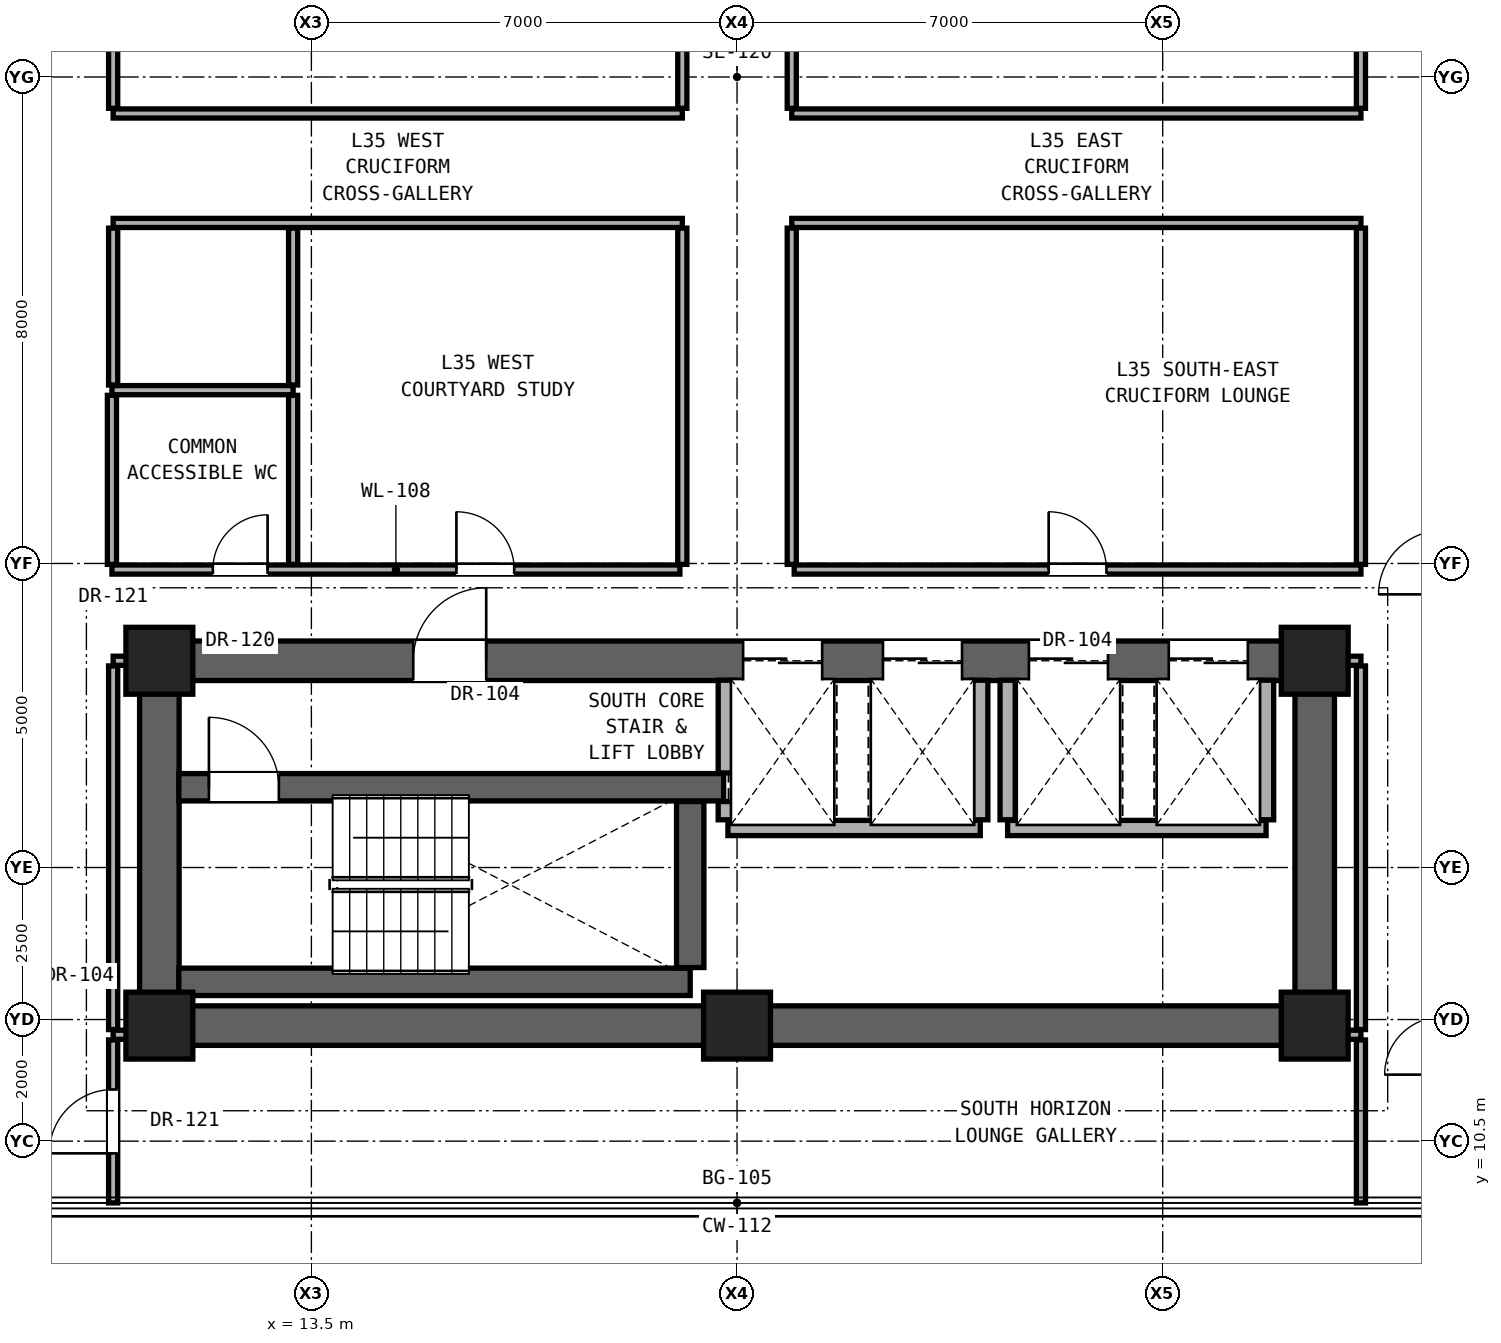
"""IFC4 building model, lengths in metres.
Left out: names, types, materials, properties, quantities, classifications, styles, units other than length and angle.
Written with IfcOpenShell. Run it as: python <this file> out.ifc"""

import sys

from ifc_helpers import new_model, si_unit, direction, frame, frame_2d, origin, origin_2d, place, context, subcontext, project, spatial, rectangle, extrude, element, fill, save


model = new_model("IFC4")
c1 = context("Model", 3, precision=1e-05, world=origin(), true_north=direction((0.0, 1.0)))
c2 = subcontext(c1, "Body", "Model", "MODEL_VIEW")
j1 = project(units=[si_unit("LENGTHUNIT", "METRE"), si_unit("PLANEANGLEUNIT", "RADIAN")], contexts=[c1])
p1 = place(None, origin())
s1 = spatial("IfcSite", under=j1, at=p1, CompositionType="ELEMENT")
p2 = place(p1, origin())
s2 = spatial("IfcBuilding", under=s1, at=p2, CompositionType="ELEMENT")
p3 = place(p2, frame((0.0, 0.0, 124.7)))
s3 = spatial("IfcBuildingStorey", under=s2, at=p3, CompositionType="ELEMENT", Elevation=124.7)
for number, where, z_axis, x_axis in (
    (1, (11.0, 12.4, 0.0), (0.0, 0.0, 1.0), (1.0, 0.0, 0.0)),
    (2, (20.5, 12.4, 0.0), (0.0, 0.0, 1.0), (1.0, 0.0, 0.0)),
    (3, (30.0, 12.4, 0.0), (0.0, 0.0, 1.0), (1.0, 0.0, 0.0)),
    (4, (11.0, 18.4, 0.0), (0.0, 0.0, 1.0), (1.0, 0.0, 0.0)),
    (5, (30.0, 18.4, 0.0), (0.0, 0.0, 1.0), (1.0, 0.0, 0.0)),
):
    element("IfcColumn", number, at=place(p3, frame(where, z_axis=z_axis, x_axis=x_axis)), inside=s3, PredefinedType="COLUMN", context=c2, shape_type="SweptSolid", body=[
        extrude(rectangle(XDim=1.1, YDim=1.1, at=origin_2d()), origin(), (0.0, 0.0, 1.0), 3.3),
    ])
p4 = place(p3, frame((11.0, 12.4, 0.0), z_axis=(0.0, 0.0, 1.0), x_axis=(1.0, 0.0, 0.0)))
e6 = element("IfcWall", 6, at=p4, inside=s3, PredefinedType="SHEAR", context=c2, shape_type="SweptSolid", body=[
    extrude(rectangle(XDim=19.0, YDim=0.65, at=frame_2d((9.5, 0.0))), origin(), (0.0, 0.0, 1.0), 3.08),
])
for number, where, z_axis, x_axis in (
    (7, (11.0, 12.4, 0.0), (0.0, 0.0, 1.0), (0.0, 1.0, 0.0)),
    (8, (30.0, 12.4, 0.0), (0.0, 0.0, 1.0), (0.0, 1.0, 0.0)),
):
    element("IfcWall", number, at=place(p3, frame(where, z_axis=z_axis, x_axis=x_axis)), inside=s3, PredefinedType="SHEAR", context=c2, shape_type="SweptSolid", body=[
        extrude(rectangle(XDim=6.0, YDim=0.65, at=frame_2d((3.0, 0.0))), origin(), (0.0, 0.0, 1.0), 3.08),
    ])
p5 = place(p3, frame((11.0, 18.4, 0.0), z_axis=(0.0, 0.0, 1.0), x_axis=(1.0, 0.0, 0.0)))
e9 = element("IfcWall", 9, at=p5, inside=s3, PredefinedType="SHEAR", context=c2, shape_type="SweptSolid", body=[
    extrude(rectangle(XDim=19.0, YDim=0.65, at=frame_2d((9.5, 0.0))), origin(), (0.0, 0.0, 1.0), 3.08),
])
p6 = place(p5, frame((4.175, 0.0, 0.0)))
e10 = element("IfcOpeningElement", 10, at=p6, cuts=e9, PredefinedType="OPENING", context=c2, shape_type="SweptSolid", body=[
    extrude(rectangle(XDim=1.2, YDim=2.25, at=frame_2d((0.6, 1.125))), frame((0.0, 0.335, 0.0), z_axis=(0.0, -1.0, 0.0), x_axis=(1.0, 0.0, 0.0)), (0.0, 0.0, 1.0), 0.67),
])
p7 = place(p5, frame((9.6, 0.0, 0.0)))
e11 = element("IfcOpeningElement", 11, at=p7, cuts=e9, PredefinedType="OPENING", context=c2, shape_type="SweptSolid", body=[
    extrude(rectangle(XDim=1.3, YDim=2.3, at=frame_2d((0.65, 1.15))), frame((0.0, 0.335, 0.0), z_axis=(0.0, -1.0, 0.0), x_axis=(1.0, 0.0, 0.0)), (0.0, 0.0, 1.0), 0.67),
])
p8 = place(p5, frame((11.9, 0.0, 0.0)))
e12 = element("IfcOpeningElement", 12, at=p8, cuts=e9, PredefinedType="OPENING", context=c2, shape_type="SweptSolid", body=[
    extrude(rectangle(XDim=1.3, YDim=2.3, at=frame_2d((0.65, 1.15))), frame((0.0, 0.335, 0.0), z_axis=(0.0, -1.0, 0.0), x_axis=(1.0, 0.0, 0.0)), (0.0, 0.0, 1.0), 0.67),
])
p9 = place(p5, frame((14.3, 0.0, 0.0)))
e13 = element("IfcOpeningElement", 13, at=p9, cuts=e9, PredefinedType="OPENING", context=c2, shape_type="SweptSolid", body=[
    extrude(rectangle(XDim=1.3, YDim=2.3, at=frame_2d((0.65, 1.15))), frame((0.0, 0.335, 0.0), z_axis=(0.0, -1.0, 0.0), x_axis=(1.0, 0.0, 0.0)), (0.0, 0.0, 1.0), 0.67),
])
p10 = place(p5, frame((16.6, 0.0, 0.0)))
e14 = element("IfcOpeningElement", 14, at=p10, cuts=e9, PredefinedType="OPENING", context=c2, shape_type="SweptSolid", body=[
    extrude(rectangle(XDim=1.3, YDim=2.3, at=frame_2d((0.65, 1.15))), frame((0.0, 0.335, 0.0), z_axis=(0.0, -1.0, 0.0), x_axis=(1.0, 0.0, 0.0)), (0.0, 0.0, 1.0), 0.67),
])
for number, where, z_axis, x_axis in (
    (15, (10.24, 12.25, 0.0), (0.0, 0.0, 1.0), (1.0, 0.0, 0.0)),
    (16, (30.32, 12.25, 0.0), (0.0, 0.0, 1.0), (1.0, 0.0, 0.0)),
):
    element("IfcWall", number, at=place(p3, frame(where, z_axis=z_axis, x_axis=x_axis)), inside=s3, PredefinedType="PARTITIONING", context=c2, shape_type="SweptSolid", body=[
        extrude(rectangle(XDim=0.44, YDim=0.15, at=frame_2d((0.22, 0.0))), origin(), (0.0, 0.0, 1.0), 3.08),
    ])
p11 = place(p3, frame((11.32, 13.12, 0.0), z_axis=(0.0, 0.0, 1.0), x_axis=(1.0, 0.0, 0.0)))
e17 = element("IfcWall", 17, at=p11, inside=s3, PredefinedType="SHEAR", context=c2, shape_type="SweptSolid", body=[
    extrude(rectangle(XDim=8.41, YDim=0.45, at=frame_2d((4.205, 0.0))), origin(), (0.0, 0.0, 1.0), 3.08),
])
p12 = place(p3, frame((20.35, 15.65, 0.0), z_axis=(0.0, 0.0, 1.0), x_axis=(1.0, 0.0, 0.0)))
e18 = element("IfcWall", 18, at=p12, inside=s3, PredefinedType="SOLIDWALL", context=c2, shape_type="SweptSolid", body=[
    extrude(rectangle(XDim=4.15, YDim=0.25, at=frame_2d((2.075, 0.0))), origin(), (0.0, 0.0, 1.0), 3.08),
])
p13 = place(p3, frame((24.95, 15.65, 0.0), z_axis=(0.0, 0.0, 1.0), x_axis=(1.0, 0.0, 0.0)))
e19 = element("IfcWall", 19, at=p13, inside=s3, PredefinedType="SOLIDWALL", context=c2, shape_type="SweptSolid", body=[
    extrude(rectangle(XDim=4.25, YDim=0.25, at=frame_2d((2.125, 0.0))), origin(), (0.0, 0.0, 1.0), 3.08),
])
p14 = place(p3, frame((11.32, 16.32, 0.0), z_axis=(0.0, 0.0, 1.0), x_axis=(1.0, 0.0, 0.0)))
e20 = element("IfcWall", 20, at=p14, inside=s3, PredefinedType="SHEAR", context=c2, shape_type="SweptSolid", body=[
    extrude(rectangle(XDim=8.96, YDim=0.45, at=frame_2d((4.48, 0.0))), origin(), (0.0, 0.0, 1.0), 3.08),
])
p15 = place(p14, frame((0.495, 0.0, 0.0)))
e21 = element("IfcOpeningElement", 21, at=p15, cuts=e20, PredefinedType="OPENING", context=c2, shape_type="SweptSolid", body=[
    extrude(rectangle(XDim=1.15, YDim=2.2, at=frame_2d((0.575, 1.1))), frame((0.0, 0.235, 0.0), z_axis=(0.0, -1.0, 0.0), x_axis=(1.0, 0.0, 0.0)), (0.0, 0.0, 1.0), 0.47),
])
for number, where, z_axis, x_axis in (
    (22, (10.24, 18.4, 0.0), (0.0, 0.0, 1.0), (1.0, 0.0, 0.0)),
    (23, (30.32, 18.4, 0.0), (0.0, 0.0, 1.0), (1.0, 0.0, 0.0)),
):
    element("IfcWall", number, at=place(p3, frame(where, z_axis=z_axis, x_axis=x_axis)), inside=s3, PredefinedType="PARTITIONING", context=c2, shape_type="SweptSolid", body=[
        extrude(rectangle(XDim=0.44, YDim=0.15, at=frame_2d((0.22, 0.0))), origin(), (0.0, 0.0, 1.0), 2.456),
    ])
p16 = place(p3, frame((10.22, 19.9, 0.0), z_axis=(0.0, 0.0, 1.0), x_axis=(1.0, 0.0, 0.0)))
e24 = element("IfcWall", 24, at=p16, inside=s3, PredefinedType="PARTITIONING", context=c2, shape_type="SweptSolid", body=[
    extrude(rectangle(XDim=9.34, YDim=0.15, at=frame_2d((4.67, 0.0))), origin(), (0.0, 0.0, 1.0), 2.216),
])
p17 = place(p16, frame((1.66, 0.0, 0.0)))
e25 = element("IfcOpeningElement", 25, at=p17, cuts=e24, PredefinedType="OPENING", context=c2, shape_type="SweptSolid", body=[
    extrude(rectangle(XDim=0.9, YDim=2.1, at=frame_2d((0.45, 1.05))), frame((0.0, 0.085, 0.0), z_axis=(0.0, -1.0, 0.0), x_axis=(1.0, 0.0, 0.0)), (0.0, 0.0, 1.0), 0.17),
])
p18 = place(p16, frame((5.665, 0.0, 0.0)))
e26 = element("IfcOpeningElement", 26, at=p18, cuts=e24, PredefinedType="OPENING", context=c2, shape_type="SweptSolid", body=[
    extrude(rectangle(XDim=0.95, YDim=2.15, at=frame_2d((0.475, 1.075))), frame((0.0, 0.085, 0.0), z_axis=(0.0, -1.0, 0.0), x_axis=(1.0, 0.0, 0.0)), (0.0, 0.0, 1.0), 0.17),
])
p19 = place(p3, frame((21.44, 19.9, 0.0), z_axis=(0.0, 0.0, 1.0), x_axis=(1.0, 0.0, 0.0)))
e27 = element("IfcWall", 27, at=p19, inside=s3, PredefinedType="PARTITIONING", context=c2, shape_type="SweptSolid", body=[
    extrude(rectangle(XDim=9.32, YDim=0.15, at=frame_2d((4.66, 0.0))), origin(), (0.0, 0.0, 1.0), 2.216),
])
p20 = place(p19, frame((4.185, 0.0, 0.0)))
e28 = element("IfcOpeningElement", 28, at=p20, cuts=e27, PredefinedType="OPENING", context=c2, shape_type="SweptSolid", body=[
    extrude(rectangle(XDim=0.95, YDim=2.15, at=frame_2d((0.475, 1.075))), frame((0.0, 0.085, 0.0), z_axis=(0.0, -1.0, 0.0), x_axis=(1.0, 0.0, 0.0)), (0.0, 0.0, 1.0), 0.17),
])
p21 = place(p3, frame((10.22, 22.85, 0.0), z_axis=(0.0, 0.0, 1.0), x_axis=(1.0, 0.0, 0.0)))
e29 = element("IfcWall", 29, at=p21, inside=s3, PredefinedType="PARTITIONING", context=c2, shape_type="SweptSolid", body=[
    extrude(rectangle(XDim=2.98, YDim=0.15, at=frame_2d((1.49, 0.0))), origin(), (0.0, 0.0, 1.0), 2.216),
])
for number, where, z_axis, x_axis in (
    (30, (10.24, 25.6, 0.0), (0.0, 0.0, 1.0), (1.0, 0.0, 0.0)),
    (31, (21.4, 25.6, 0.0), (0.0, 0.0, 1.0), (1.0, 0.0, 0.0)),
    (32, (10.24, 27.4, 0.0), (0.0, 0.0, 1.0), (1.0, 0.0, 0.0)),
    (33, (21.4, 27.4, 0.0), (0.0, 0.0, 1.0), (1.0, 0.0, 0.0)),
):
    element("IfcWall", number, at=place(p3, frame(where, z_axis=z_axis, x_axis=x_axis)), inside=s3, PredefinedType="PARTITIONING", context=c2, shape_type="SweptSolid", body=[
        extrude(rectangle(XDim=9.36, YDim=0.15, at=frame_2d((4.68, 0.0))), origin(), (0.0, 0.0, 1.0), 2.216),
    ])
p22 = place(p3, frame((10.22, 19.985, 0.0), z_axis=(0.0, 0.0, 1.0), x_axis=(0.0, 1.0, 0.0)))
e34 = element("IfcWall", 34, at=p22, inside=s3, PredefinedType="PARTITIONING", context=c2, shape_type="SweptSolid", body=[
    extrude(rectangle(XDim=2.78, YDim=0.15, at=frame_2d((1.39, 0.0))), origin(), (0.0, 0.0, 1.0), 3.08),
])
p23 = place(p3, frame((10.24, 9.484, 0.0), z_axis=(0.0, 0.0, 1.0), x_axis=(0.0, 1.0, 0.0)))
e35 = element("IfcWall", 35, at=p23, inside=s3, PredefinedType="PARTITIONING", context=c2, shape_type="SweptSolid", body=[
    extrude(rectangle(XDim=2.681, YDim=0.15, at=frame_2d((1.341, 0.0))), origin(), (0.0, 0.0, 1.0), 3.08),
])
p24 = place(p23, frame((0.815, 0.0, 0.0)))
e36 = element("IfcOpeningElement", 36, at=p24, cuts=e35, PredefinedType="OPENING", context=c2, shape_type="SweptSolid", body=[
    extrude(rectangle(XDim=1.05, YDim=2.2, at=frame_2d((0.525, 1.1))), frame((0.0, 0.085, 0.0), z_axis=(0.0, -1.0, 0.0), x_axis=(1.0, 0.0, 0.0)), (0.0, 0.0, 1.0), 0.17),
])
p25 = place(p3, frame((10.24, 12.335, 0.0), z_axis=(0.0, 0.0, 1.0), x_axis=(0.0, 1.0, 0.0)))
e37 = element("IfcWall", 37, at=p25, inside=s3, PredefinedType="PARTITIONING", context=c2, shape_type="SweptSolid", body=[
    extrude(rectangle(XDim=5.98, YDim=0.15, at=frame_2d((2.99, 0.0))), origin(), (0.0, 0.0, 1.0), 2.456),
])
p26 = place(p3, frame((10.24, 22.935, 0.0), z_axis=(0.0, 0.0, 1.0), x_axis=(0.0, 1.0, 0.0)))
e38 = element("IfcWall", 38, at=p26, inside=s3, PredefinedType="PARTITIONING", context=c2, shape_type="SweptSolid", body=[
    extrude(rectangle(XDim=2.58, YDim=0.15, at=frame_2d((1.29, 0.0))), origin(), (0.0, 0.0, 1.0), 2.299),
])
p27 = place(p3, frame((10.24, 27.485, 0.0), z_axis=(0.0, 0.0, 1.0), x_axis=(0.0, 1.0, 0.0)))
e39 = element("IfcWall", 39, at=p27, inside=s3, PredefinedType="PARTITIONING", context=c2, shape_type="SweptSolid", body=[
    extrude(rectangle(XDim=5.53, YDim=0.15, at=frame_2d((2.765, 0.0))), origin(), (0.0, 0.0, 1.0), 2.299),
])
p28 = place(p27, frame((2.29, 0.0, 0.0)))
e40 = element("IfcOpeningElement", 40, at=p28, cuts=e39, PredefinedType="OPENING", context=c2, shape_type="SweptSolid", body=[
    extrude(rectangle(XDim=0.95, YDim=2.15, at=frame_2d((0.475, 1.075))), frame((0.0, 0.085, 0.0), z_axis=(0.0, -1.0, 0.0), x_axis=(1.0, 0.0, 0.0)), (0.0, 0.0, 1.0), 0.17),
])
p29 = place(p3, frame((13.2, 19.985, 0.0), z_axis=(0.0, 0.0, 1.0), x_axis=(0.0, 1.0, 0.0)))
e41 = element("IfcWall", 41, at=p29, inside=s3, PredefinedType="PARTITIONING", context=c2, shape_type="SweptSolid", body=[
    extrude(rectangle(XDim=2.78, YDim=0.15, at=frame_2d((1.39, 0.0))), origin(), (0.0, 0.0, 1.0), 3.08),
])
p30 = place(p3, frame((13.2, 22.935, 0.0), z_axis=(0.0, 0.0, 1.0), x_axis=(0.0, 1.0, 0.0)))
e42 = element("IfcWall", 42, at=p30, inside=s3, PredefinedType="PARTITIONING", context=c2, shape_type="SweptSolid", body=[
    extrude(rectangle(XDim=2.58, YDim=0.15, at=frame_2d((1.29, 0.0))), origin(), (0.0, 0.0, 1.0), 2.216),
])
for number, where, z_axis, x_axis in (
    (43, (19.6, 19.985, 0.0), (0.0, 0.0, 1.0), (0.0, 1.0, 0.0)),
    (44, (19.6, 27.485, 0.0), (0.0, 0.0, 1.0), (0.0, 1.0, 0.0)),
):
    element("IfcWall", number, at=place(p3, frame(where, z_axis=z_axis, x_axis=x_axis)), inside=s3, PredefinedType="PARTITIONING", context=c2, shape_type="SweptSolid", body=[
        extrude(rectangle(XDim=5.53, YDim=0.15, at=frame_2d((2.765, 0.0))), origin(), (0.0, 0.0, 1.0), 2.216),
    ])
p31 = place(p3, frame((19.73, 13.355, 0.0), z_axis=(0.0, 0.0, 1.0), x_axis=(0.0, 1.0, 0.0)))
e45 = element("IfcWall", 45, at=p31, inside=s3, PredefinedType="SHEAR", context=c2, shape_type="SweptSolid", body=[
    extrude(rectangle(XDim=2.73, YDim=0.45, at=frame_2d((1.365, 0.0))), origin(), (0.0, 0.0, 1.0), 3.08),
])
p32 = place(p3, frame((20.315, 15.785, 0.0), z_axis=(0.0, 0.0, 1.0), x_axis=(0.0, 1.0, 0.0)))
e46 = element("IfcWall", 46, at=p32, inside=s3, PredefinedType="SOLIDWALL", context=c2, shape_type="SweptSolid", body=[
    extrude(rectangle(XDim=0.3, YDim=0.25, at=frame_2d((0.15, 0.0))), origin(), (0.0, 0.0, 1.0), 3.08),
])
p33 = place(p3, frame((20.315, 16.555, 0.0), z_axis=(0.0, 0.0, 1.0), x_axis=(0.0, 1.0, 0.0)))
e47 = element("IfcWall", 47, at=p33, inside=s3, PredefinedType="SOLIDWALL", context=c2, shape_type="SweptSolid", body=[
    extrude(rectangle(XDim=1.525, YDim=0.25, at=frame_2d((0.763, 0.0))), origin(), (0.0, 0.0, 1.0), 3.08),
])
for number, where, z_axis, x_axis in (
    (48, (21.4, 19.985, 0.0), (0.0, 0.0, 1.0), (0.0, 1.0, 0.0)),
    (49, (21.4, 27.485, 0.0), (0.0, 0.0, 1.0), (0.0, 1.0, 0.0)),
):
    element("IfcWall", number, at=place(p3, frame(where, z_axis=z_axis, x_axis=x_axis)), inside=s3, PredefinedType="PARTITIONING", context=c2, shape_type="SweptSolid", body=[
        extrude(rectangle(XDim=5.53, YDim=0.15, at=frame_2d((2.765, 0.0))), origin(), (0.0, 0.0, 1.0), 2.216),
    ])
for number, where, z_axis, x_axis in (
    (50, (24.5, 15.785, 0.0), (0.0, 0.0, 1.0), (0.0, 1.0, 0.0)),
    (51, (24.95, 15.785, 0.0), (0.0, 0.0, 1.0), (0.0, 1.0, 0.0)),
    (52, (29.2, 15.785, 0.0), (0.0, 0.0, 1.0), (0.0, 1.0, 0.0)),
):
    element("IfcWall", number, at=place(p3, frame(where, z_axis=z_axis, x_axis=x_axis)), inside=s3, PredefinedType="SOLIDWALL", context=c2, shape_type="SweptSolid", body=[
        extrude(rectangle(XDim=2.295, YDim=0.25, at=frame_2d((1.147, 0.0))), origin(), (0.0, 0.0, 1.0), 3.08),
    ])
p34 = place(p3, frame((30.76, 9.484, 0.0), z_axis=(0.0, 0.0, 1.0), x_axis=(0.0, 1.0, 0.0)))
e53 = element("IfcWall", 53, at=p34, inside=s3, PredefinedType="PARTITIONING", context=c2, shape_type="SweptSolid", body=[
    extrude(rectangle(XDim=2.681, YDim=0.15, at=frame_2d((1.341, 0.0))), origin(), (0.0, 0.0, 1.0), 3.08),
])
p35 = place(p3, frame((30.76, 12.335, 0.0), z_axis=(0.0, 0.0, 1.0), x_axis=(0.0, 1.0, 0.0)))
e54 = element("IfcWall", 54, at=p35, inside=s3, PredefinedType="PARTITIONING", context=c2, shape_type="SweptSolid", body=[
    extrude(rectangle(XDim=5.98, YDim=0.15, at=frame_2d((2.99, 0.0))), origin(), (0.0, 0.0, 1.0), 2.456),
])
for number, where, z_axis, x_axis in (
    (55, (30.76, 19.985, 0.0), (0.0, 0.0, 1.0), (0.0, 1.0, 0.0)),
    (56, (30.76, 27.485, 0.0), (0.0, 0.0, 1.0), (0.0, 1.0, 0.0)),
):
    element("IfcWall", number, at=place(p3, frame(where, z_axis=z_axis, x_axis=x_axis)), inside=s3, PredefinedType="PARTITIONING", context=c2, shape_type="SweptSolid", body=[
        extrude(rectangle(XDim=5.53, YDim=0.15, at=frame_2d((2.765, 0.0))), origin(), (0.0, 0.0, 1.0), 2.299),
    ])
p36 = place(p6, origin())
e57 = element("IfcDoor", 57, at=p36, inside=s3, OperationType="SINGLE_SWING_RIGHT", PredefinedType="DOOR", context=c2, shape_type="SweptSolid", body=[
    extrude(rectangle(XDim=1.2, YDim=2.25, at=frame_2d((0.6, 1.125))), frame((0.0, 0.025, 0.0), z_axis=(0.0, -1.0, 0.0), x_axis=(1.0, 0.0, 0.0)), (0.0, 0.0, 1.0), 0.05),
])
fill(e10, e57)
p37 = place(p15, origin())
e58 = element("IfcDoor", 58, at=p37, inside=s3, OperationType="SINGLE_SWING_LEFT", PredefinedType="DOOR", context=c2, shape_type="SweptSolid", body=[
    extrude(rectangle(XDim=1.15, YDim=2.2, at=frame_2d((0.575, 1.1))), frame((0.0, 0.025, 0.0), z_axis=(0.0, -1.0, 0.0), x_axis=(1.0, 0.0, 0.0)), (0.0, 0.0, 1.0), 0.05),
])
fill(e21, e58)
p38 = place(p17, origin())
e59 = element("IfcDoor", 59, at=p38, inside=s3, OperationType="SINGLE_SWING_RIGHT", PredefinedType="DOOR", context=c2, shape_type="SweptSolid", body=[
    extrude(rectangle(XDim=0.9, YDim=2.1, at=frame_2d((0.45, 1.05))), frame((0.0, 0.025, 0.0), z_axis=(0.0, -1.0, 0.0), x_axis=(1.0, 0.0, 0.0)), (0.0, 0.0, 1.0), 0.05),
])
fill(e25, e59)
p39 = place(p18, origin())
e60 = element("IfcDoor", 60, at=p39, inside=s3, OperationType="SINGLE_SWING_LEFT", PredefinedType="DOOR", context=c2, shape_type="SweptSolid", body=[
    extrude(rectangle(XDim=0.95, YDim=2.15, at=frame_2d((0.475, 1.075))), frame((0.0, 0.025, 0.0), z_axis=(0.0, -1.0, 0.0), x_axis=(1.0, 0.0, 0.0)), (0.0, 0.0, 1.0), 0.05),
])
fill(e26, e60)
p40 = place(p20, origin())
e61 = element("IfcDoor", 61, at=p40, inside=s3, OperationType="SINGLE_SWING_LEFT", PredefinedType="DOOR", context=c2, shape_type="SweptSolid", body=[
    extrude(rectangle(XDim=0.95, YDim=2.15, at=frame_2d((0.475, 1.075))), frame((0.0, 0.025, 0.0), z_axis=(0.0, -1.0, 0.0), x_axis=(1.0, 0.0, 0.0)), (0.0, 0.0, 1.0), 0.05),
])
fill(e28, e61)
p41 = place(p24, origin())
e62 = element("IfcDoor", 62, at=p41, inside=s3, OperationType="SINGLE_SWING_LEFT", PredefinedType="DOOR", context=c2, shape_type="SweptSolid", body=[
    extrude(rectangle(XDim=1.05, YDim=2.2, at=frame_2d((0.525, 1.1))), frame((0.0, 0.025, 0.0), z_axis=(0.0, -1.0, 0.0), x_axis=(1.0, 0.0, 0.0)), (0.0, 0.0, 1.0), 0.05),
])
fill(e36, e62)
p42 = place(p7, origin())
e63 = element("IfcDoor", 63, at=p42, inside=s3, OperationType="DOUBLE_DOOR_SLIDING", PredefinedType="DOOR", context=c2, shape_type="SweptSolid", body=[
    extrude(rectangle(XDim=1.3, YDim=2.3, at=frame_2d((0.65, 1.15))), frame((0.0, 0.025, 0.0), z_axis=(0.0, -1.0, 0.0), x_axis=(1.0, 0.0, 0.0)), (0.0, 0.0, 1.0), 0.05),
])
fill(e11, e63)
p43 = place(p8, origin())
e64 = element("IfcDoor", 64, at=p43, inside=s3, OperationType="DOUBLE_DOOR_SLIDING", PredefinedType="DOOR", context=c2, shape_type="SweptSolid", body=[
    extrude(rectangle(XDim=1.3, YDim=2.3, at=frame_2d((0.65, 1.15))), frame((0.0, 0.025, 0.0), z_axis=(0.0, -1.0, 0.0), x_axis=(1.0, 0.0, 0.0)), (0.0, 0.0, 1.0), 0.05),
])
fill(e12, e64)
p44 = place(p9, origin())
e65 = element("IfcDoor", 65, at=p44, inside=s3, OperationType="DOUBLE_DOOR_SLIDING", PredefinedType="DOOR", context=c2, shape_type="SweptSolid", body=[
    extrude(rectangle(XDim=1.3, YDim=2.3, at=frame_2d((0.65, 1.15))), frame((0.0, 0.025, 0.0), z_axis=(0.0, -1.0, 0.0), x_axis=(1.0, 0.0, 0.0)), (0.0, 0.0, 1.0), 0.05),
])
fill(e13, e65)
p45 = place(p10, origin())
e66 = element("IfcDoor", 66, at=p45, inside=s3, OperationType="DOUBLE_DOOR_SLIDING", PredefinedType="DOOR", context=c2, shape_type="SweptSolid", body=[
    extrude(rectangle(XDim=1.3, YDim=2.3, at=frame_2d((0.65, 1.15))), frame((0.0, 0.025, 0.0), z_axis=(0.0, -1.0, 0.0), x_axis=(1.0, 0.0, 0.0)), (0.0, 0.0, 1.0), 0.05),
])
fill(e14, e66)
save(model, sys.argv[1])
